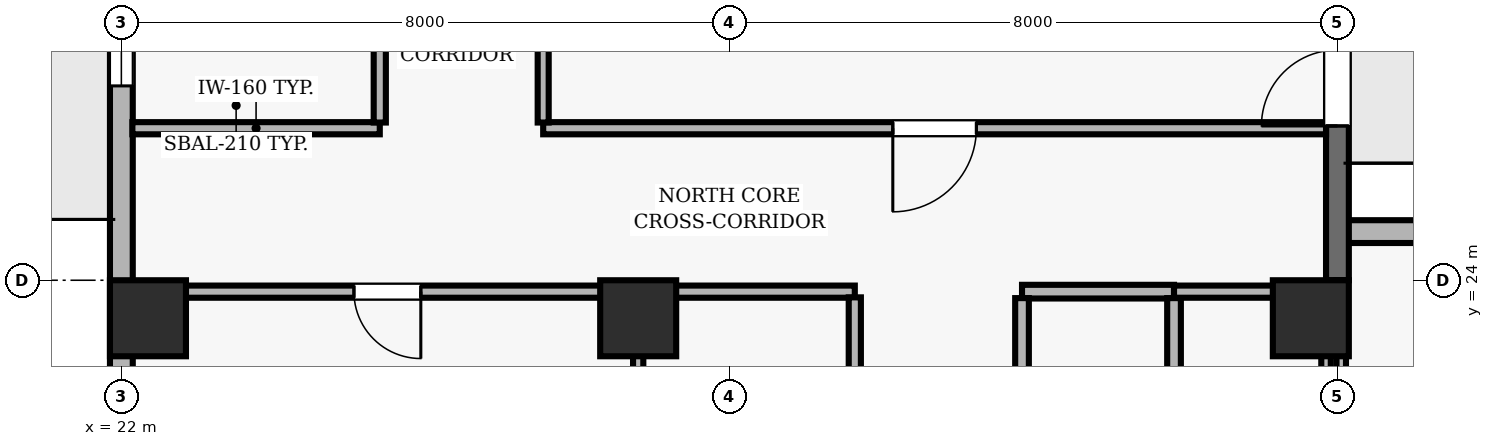
"""IFC4 building model, lengths in metres.
Left out: names, types, materials, properties, quantities, classifications, styles, units other than length and angle.
Written with IfcOpenShell. Run it as: python <this file> out.ifc"""

import sys

from ifc_helpers import new_model, si_unit, direction, frame, frame_2d, origin, origin_2d, place, context, subcontext, project, spatial, rectangle, extrude, element, fill, save


model = new_model("IFC4")
c1 = context("Model", 3, precision=1e-05, world=origin(), true_north=direction((0.0, 1.0)))
c2 = subcontext(c1, "Body", "Model", "MODEL_VIEW")
j1 = project(units=[si_unit("LENGTHUNIT", "METRE"), si_unit("PLANEANGLEUNIT", "RADIAN")], contexts=[c1])
p1 = place(None, origin())
s1 = spatial("IfcSite", under=j1, at=p1, CompositionType="ELEMENT")
p2 = place(p1, origin())
s2 = spatial("IfcBuilding", under=s1, at=p2, CompositionType="ELEMENT")
p3 = place(p2, frame((0.0, 0.0, 183.6)))
s3 = spatial("IfcBuildingStorey", under=s2, at=p3, CompositionType="ELEMENT", Elevation=183.6)
for number, where, z_axis, x_axis in (
    (1, (22.35, 23.5, 0.0), (0.0, 0.0, 1.0), (1.0, 0.0, 0.0)),
    (2, (28.8, 23.5, 0.0), (0.0, 0.0, 1.0), (1.0, 0.0, 0.0)),
    (3, (37.65, 23.5, 0.0), (0.0, 0.0, 1.0), (1.0, 0.0, 0.0)),
):
    element("IfcColumn", number, at=place(p3, frame(where, z_axis=z_axis, x_axis=x_axis)), inside=s3, PredefinedType="COLUMN", context=c2, shape_type="SweptSolid", body=[
        extrude(rectangle(XDim=1.0, YDim=1.0, at=origin_2d()), origin(), (0.0, 0.0, 1.0), 3.9),
    ])
p4 = place(p3, frame((48.8, 24.64, 0.0), z_axis=(0.0, 0.0, 1.0), x_axis=(-1.0, 0.0, 0.0)))
e4 = element("IfcWall", 4, at=p4, inside=s3, PredefinedType="SOLIDWALL", context=c2, shape_type="SweptSolid", body=[
    extrude(rectangle(XDim=10.8, YDim=0.3, at=frame_2d((5.4, 0.0))), origin(), (0.0, 0.0, 1.0), 3.69),
])
p5 = place(p4, frame((4.35, 0.0, 0.9)))
e5 = element("IfcOpeningElement", 5, at=p5, cuts=e4, PredefinedType="OPENING", context=c2, shape_type="SweptSolid", body=[
    extrude(rectangle(XDim=2.1, YDim=1.6, at=frame_2d((1.05, 0.8))), frame((0.0, 0.16, 0.0), z_axis=(0.0, -1.0, 0.0), x_axis=(1.0, 0.0, 0.0)), (0.0, 0.0, 1.0), 0.32),
])
p6 = place(p3, frame((38.0, 24.0, 0.0), z_axis=(0.0, 0.0, 1.0), x_axis=(0.0, 1.0, 0.0)))
e6 = element("IfcWall", 6, at=p6, inside=s3, PredefinedType="SOLIDWALL", context=c2, shape_type="SweptSolid", body=[
    extrude(rectangle(XDim=16.7, YDim=0.3, at=frame_2d((8.35, 0.0))), origin(), (0.0, 0.0, 1.0), 3.69),
])
p7 = place(p6, frame((2.03, 0.0, 0.0)))
e7 = element("IfcOpeningElement", 7, at=p7, cuts=e6, PredefinedType="OPENING", context=c2, shape_type="SweptSolid", body=[
    extrude(rectangle(XDim=1.0, YDim=2.2, at=frame_2d((0.5, 1.1))), frame((0.0, 0.16, 0.0), z_axis=(0.0, -1.0, 0.0), x_axis=(1.0, 0.0, 0.0)), (0.0, 0.0, 1.0), 0.32),
])
p8 = place(p3, frame((22.0, 40.7, 0.0), z_axis=(0.0, 0.0, 1.0), x_axis=(0.0, -1.0, 0.0)))
e8 = element("IfcWall", 8, at=p8, inside=s3, PredefinedType="SOLIDWALL", context=c2, shape_type="SweptSolid", body=[
    extrude(rectangle(XDim=38.2, YDim=0.3, at=frame_2d((19.1, 0.0))), origin(), (0.0, 0.0, 1.0), 3.69),
])
p9 = place(p8, frame((6.7, 0.0, 0.0)))
e9 = element("IfcOpeningElement", 9, at=p9, cuts=e8, PredefinedType="OPENING", context=c2, shape_type="SweptSolid", body=[
    extrude(rectangle(XDim=1.0, YDim=2.2, at=frame_2d((0.5, 1.1))), frame((0.0, 0.16, 0.0), z_axis=(0.0, -1.0, 0.0), x_axis=(1.0, 0.0, 0.0)), (0.0, 0.0, 1.0), 0.32),
])
p10 = place(p8, frame((11.343, 0.0, 0.9)))
e10 = element("IfcOpeningElement", 10, at=p10, cuts=e8, PredefinedType="OPENING", context=c2, shape_type="SweptSolid", body=[
    extrude(rectangle(XDim=2.8, YDim=1.8, at=frame_2d((1.4, 0.9))), frame((0.0, 0.16, 0.0), z_axis=(0.0, -1.0, 0.0), x_axis=(1.0, 0.0, 0.0)), (0.0, 0.0, 1.0), 0.32),
])
p11 = place(p8, frame((18.15, 0.0, 0.9)))
e11 = element("IfcOpeningElement", 11, at=p11, cuts=e8, PredefinedType="OPENING", context=c2, shape_type="SweptSolid", body=[
    extrude(rectangle(XDim=2.8, YDim=1.8, at=frame_2d((1.4, 0.9))), frame((0.0, 0.16, 0.0), z_axis=(0.0, -1.0, 0.0), x_axis=(1.0, 0.0, 0.0)), (0.0, 0.0, 1.0), 0.32),
])
p12 = place(p8, frame((22.257, 0.0, 0.9)))
e12 = element("IfcOpeningElement", 12, at=p12, cuts=e8, PredefinedType="OPENING", context=c2, shape_type="SweptSolid", body=[
    extrude(rectangle(XDim=2.8, YDim=1.8, at=frame_2d((1.4, 0.9))), frame((0.0, 0.16, 0.0), z_axis=(0.0, -1.0, 0.0), x_axis=(1.0, 0.0, 0.0)), (0.0, 0.0, 1.0), 0.32),
])
p13 = place(p8, frame((28.614, 0.0, 0.9)))
e13 = element("IfcOpeningElement", 13, at=p13, cuts=e8, PredefinedType="OPENING", context=c2, shape_type="SweptSolid", body=[
    extrude(rectangle(XDim=2.8, YDim=1.8, at=frame_2d((1.4, 0.9))), frame((0.0, 0.16, 0.0), z_axis=(0.0, -1.0, 0.0), x_axis=(1.0, 0.0, 0.0)), (0.0, 0.0, 1.0), 0.32),
])
p14 = place(p3, frame((25.4, 26.0, 0.0), z_axis=(0.0, 0.0, 1.0), x_axis=(-1.0, 0.0, 0.0)))
e14 = element("IfcWall", 14, at=p14, inside=s3, PredefinedType="PARTITIONING", context=c2, shape_type="SweptSolid", body=[
    extrude(rectangle(XDim=3.255, YDim=0.16, at=frame_2d((1.627, 0.0))), origin(), (0.0, 0.0, 1.0), 3.69),
])
p15 = place(p3, frame((28.8, 23.85, 0.0), z_axis=(0.0, 0.0, 1.0), x_axis=(-1.0, 0.0, 0.0)))
e15 = element("IfcWall", 15, at=p15, inside=s3, PredefinedType="PARTITIONING", context=c2, shape_type="SweptSolid", body=[
    extrude(rectangle(XDim=6.6, YDim=0.16, at=frame_2d((3.3, 0.0))), origin(), (0.0, 0.0, 1.0), 3.139),
])
p16 = place(p15, frame((2.86, 0.0, 0.0)))
e16 = element("IfcOpeningElement", 16, at=p16, cuts=e15, PredefinedType="OPENING", context=c2, shape_type="SweptSolid", body=[
    extrude(rectangle(XDim=0.88, YDim=2.1, at=frame_2d((0.44, 1.05))), frame((0.0, 0.09, 0.0), z_axis=(0.0, -1.0, 0.0), x_axis=(1.0, 0.0, 0.0)), (0.0, 0.0, 1.0), 0.18),
])
p17 = place(p3, frame((31.65, 23.85, 0.0), z_axis=(0.0, 0.0, 1.0), x_axis=(-1.0, 0.0, 0.0)))
e17 = element("IfcWall", 17, at=p17, inside=s3, PredefinedType="PARTITIONING", context=c2, shape_type="SweptSolid", body=[
    extrude(rectangle(XDim=2.85, YDim=0.16, at=frame_2d((1.425, 0.0))), origin(), (0.0, 0.0, 1.0), 3.139),
])
p18 = place(p3, frame((35.85, 23.85, 0.0), z_axis=(0.0, 0.0, 1.0), x_axis=(-1.0, 0.0, 0.0)))
e18 = element("IfcWall", 18, at=p18, inside=s3, PredefinedType="PARTITIONING", context=c2, shape_type="SweptSolid", body=[
    extrude(rectangle(XDim=2.0, YDim=0.18, at=frame_2d((1.0, 0.0))), origin(), (0.0, 0.0, 1.0), 3.139),
])
p19 = place(p3, frame((37.85, 23.85, 0.0), z_axis=(0.0, 0.0, 1.0), x_axis=(-1.0, 0.0, 0.0)))
e19 = element("IfcWall", 19, at=p19, inside=s3, PredefinedType="PARTITIONING", context=c2, shape_type="SweptSolid", body=[
    extrude(rectangle(XDim=2.0, YDim=0.16, at=frame_2d((1.0, 0.0))), origin(), (0.0, 0.0, 1.0), 3.139),
])
p20 = place(p3, frame((37.85, 26.0, 0.0), z_axis=(0.0, 0.0, 1.0), x_axis=(-1.0, 0.0, 0.0)))
e20 = element("IfcWall", 20, at=p20, inside=s3, PredefinedType="PARTITIONING", context=c2, shape_type="SweptSolid", body=[
    extrude(rectangle(XDim=10.3, YDim=0.16, at=frame_2d((5.15, 0.0))), origin(), (0.0, 0.0, 1.0), 3.69),
])
p21 = place(p20, frame((4.6, 0.0, 0.0)))
e21 = element("IfcOpeningElement", 21, at=p21, cuts=e20, PredefinedType="OPENING", context=c2, shape_type="SweptSolid", body=[
    extrude(rectangle(XDim=1.1, YDim=2.15, at=frame_2d((0.55, 1.075))), frame((0.0, 0.09, 0.0), z_axis=(0.0, -1.0, 0.0), x_axis=(1.0, 0.0, 0.0)), (0.0, 0.0, 1.0), 0.18),
])
p22 = place(p3, frame((25.4, 31.765, 0.0), z_axis=(0.0, 0.0, 1.0), x_axis=(0.0, -1.0, 0.0)))
e22 = element("IfcWall", 22, at=p22, inside=s3, PredefinedType="PARTITIONING", context=c2, shape_type="SweptSolid", body=[
    extrude(rectangle(XDim=5.69, YDim=0.16, at=frame_2d((2.845, 0.0))), origin(), (0.0, 0.0, 1.0), 3.69),
])
p23 = place(p22, frame((2.345, 0.0, 0.0)))
e23 = element("IfcOpeningElement", 23, at=p23, cuts=e22, PredefinedType="OPENING", context=c2, shape_type="SweptSolid", body=[
    extrude(rectangle(XDim=1.0, YDim=2.1, at=frame_2d((0.5, 1.05))), frame((0.0, 0.09, 0.0), z_axis=(0.0, -1.0, 0.0), x_axis=(1.0, 0.0, 0.0)), (0.0, 0.0, 1.0), 0.18),
])
p24 = place(p3, frame((27.55, 26.075, 0.0), z_axis=(0.0, 0.0, 1.0), x_axis=(0.0, 1.0, 0.0)))
e24 = element("IfcWall", 24, at=p24, inside=s3, PredefinedType="PARTITIONING", context=c2, shape_type="SweptSolid", body=[
    extrude(rectangle(XDim=5.708, YDim=0.145, at=frame_2d((2.854, 0.0))), origin(), (0.0, 0.0, 1.0), 3.69),
])
p25 = place(p3, frame((28.8, 23.775, 0.0), z_axis=(0.0, 0.0, 1.0), x_axis=(0.0, -1.0, 0.0)))
e25 = element("IfcWall", 25, at=p25, inside=s3, PredefinedType="PARTITIONING", context=c2, shape_type="SweptSolid", body=[
    extrude(rectangle(XDim=4.615, YDim=0.135, at=frame_2d((2.308, 0.0))), origin(), (0.0, 0.0, 1.0), 3.69),
])
p26 = place(p3, frame((31.65, 19.01, 0.0), z_axis=(0.0, 0.0, 1.0), x_axis=(0.0, 1.0, 0.0)))
e26 = element("IfcWall", 26, at=p26, inside=s3, PredefinedType="PARTITIONING", context=c2, shape_type="SweptSolid", body=[
    extrude(rectangle(XDim=4.765, YDim=0.16, at=frame_2d((2.382, 0.0))), origin(), (0.0, 0.0, 1.0), 3.69),
])
p27 = place(p26, frame((1.932, 0.0, 0.0)))
e27 = element("IfcOpeningElement", 27, at=p27, cuts=e26, PredefinedType="OPENING", context=c2, shape_type="SweptSolid", body=[
    extrude(rectangle(XDim=0.9, YDim=2.1, at=frame_2d((0.45, 1.05))), frame((0.0, 0.09, 0.0), z_axis=(0.0, -1.0, 0.0), x_axis=(1.0, 0.0, 0.0)), (0.0, 0.0, 1.0), 0.18),
])
p28 = place(p3, frame((33.85, 17.735, 0.0), z_axis=(0.0, 0.0, 1.0), x_axis=(0.0, 1.0, 0.0)))
e28 = element("IfcWall", 28, at=p28, inside=s3, PredefinedType="PARTITIONING", context=c2, shape_type="SweptSolid", body=[
    extrude(rectangle(XDim=6.03, YDim=0.18, at=frame_2d((3.015, 0.0))), origin(), (0.0, 0.0, 1.0), 3.69),
])
p29 = place(p28, frame((2.54, 0.0, 0.0)))
e29 = element("IfcOpeningElement", 29, at=p29, cuts=e28, PredefinedType="OPENING", context=c2, shape_type="SweptSolid", body=[
    extrude(rectangle(XDim=0.95, YDim=2.1, at=frame_2d((0.475, 1.05))), frame((0.0, 0.1, 0.0), z_axis=(0.0, -1.0, 0.0), x_axis=(1.0, 0.0, 0.0)), (0.0, 0.0, 1.0), 0.2),
])
p30 = place(p3, frame((35.85, 21.258, 0.0), z_axis=(0.0, 0.0, 1.0), x_axis=(0.0, 1.0, 0.0)))
e30 = element("IfcWall", 30, at=p30, inside=s3, PredefinedType="PARTITIONING", context=c2, shape_type="SweptSolid", body=[
    extrude(rectangle(XDim=2.507, YDim=0.18, at=frame_2d((1.253, 0.0))), origin(), (0.0, 0.0, 1.0), 3.69),
])
p31 = place(p30, frame((0.454, 0.0, 0.0)))
e31 = element("IfcOpeningElement", 31, at=p31, cuts=e30, PredefinedType="OPENING", context=c2, shape_type="SweptSolid", body=[
    extrude(rectangle(XDim=0.9, YDim=2.1, at=frame_2d((0.45, 1.05))), frame((0.0, 0.1, 0.0), z_axis=(0.0, -1.0, 0.0), x_axis=(1.0, 0.0, 0.0)), (0.0, 0.0, 1.0), 0.2),
])
p32 = place(p3, frame((37.85, 21.258, 0.0), z_axis=(0.0, 0.0, 1.0), x_axis=(0.0, 1.0, 0.0)))
e32 = element("IfcWall", 32, at=p32, inside=s3, PredefinedType="PARTITIONING", context=c2, shape_type="SweptSolid", body=[
    extrude(rectangle(XDim=2.517, YDim=0.125, at=frame_2d((1.258, 0.0))), origin(), (0.0, 0.0, 1.0), 3.139),
])
p33 = place(p3, frame((38.05, 24.0, 0.0), z_axis=(0.0, 0.0, 1.0), x_axis=(0.0, -1.0, 0.0)))
e33 = element("IfcWall", 33, at=p33, inside=s3, PredefinedType="PARTITIONING", context=c2, shape_type="SweptSolid", body=[
    extrude(rectangle(XDim=7.925, YDim=0.125, at=frame_2d((3.962, 0.0))), origin(), (0.0, 0.0, 1.0), 3.139),
])
p34 = place(p7, origin())
e34 = element("IfcDoor", 34, at=p34, inside=s3, OperationType="SINGLE_SWING_LEFT", PredefinedType="DOOR", context=c2, shape_type="SweptSolid", body=[
    extrude(rectangle(XDim=1.0, YDim=2.2, at=frame_2d((0.5, 1.1))), frame((0.0, 0.025, 0.0), z_axis=(0.0, -1.0, 0.0), x_axis=(1.0, 0.0, 0.0)), (0.0, 0.0, 1.0), 0.05),
])
fill(e7, e34)
p35 = place(p10, origin())
e35 = element("IfcWindow", 35, at=p35, inside=s3, PartitioningType="SINGLE_PANEL", PredefinedType="WINDOW", context=c2, shape_type="SweptSolid", body=[
    extrude(rectangle(XDim=2.8, YDim=1.8, at=frame_2d((1.4, 0.9))), frame((0.0, 0.03, 0.0), z_axis=(0.0, -1.0, 0.0), x_axis=(1.0, 0.0, 0.0)), (0.0, 0.0, 1.0), 0.06),
])
fill(e10, e35)
p36 = place(p16, origin())
e36 = element("IfcDoor", 36, at=p36, inside=s3, OperationType="SINGLE_SWING_LEFT", PredefinedType="DOOR", context=c2, shape_type="SweptSolid", body=[
    extrude(rectangle(XDim=0.88, YDim=2.1, at=frame_2d((0.44, 1.05))), frame((0.0, 0.025, 0.0), z_axis=(0.0, -1.0, 0.0), x_axis=(1.0, 0.0, 0.0)), (0.0, 0.0, 1.0), 0.05),
])
fill(e16, e36)
p37 = place(p21, origin())
e37 = element("IfcDoor", 37, at=p37, inside=s3, OperationType="SINGLE_SWING_RIGHT", PredefinedType="DOOR", context=c2, shape_type="SweptSolid", body=[
    extrude(rectangle(XDim=1.1, YDim=2.15, at=frame_2d((0.55, 1.075))), frame((0.0, 0.025, 0.0), z_axis=(0.0, -1.0, 0.0), x_axis=(1.0, 0.0, 0.0)), (0.0, 0.0, 1.0), 0.05),
])
fill(e21, e37)
save(model, sys.argv[1])
